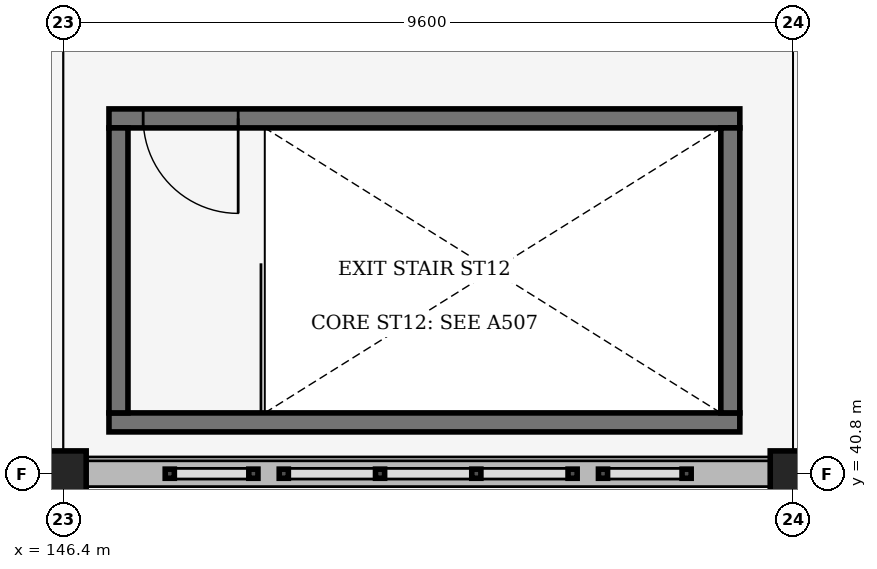
"""IFC4 building model, lengths in metres.
Left out: names, types, materials, properties, quantities, classifications, styles, units other than length and angle.
Written with IfcOpenShell. Run it as: python <this file> out.ifc"""

import sys

from ifc_helpers import new_model, si_unit, direction, frame, frame_2d, origin, origin_2d, place, context, subcontext, project, spatial, rectangle, extrude, element, fill, save


model = new_model("IFC4")
c1 = context("Model", 3, precision=1e-05, world=origin(), true_north=direction((0.0, 1.0)))
c2 = subcontext(c1, "Body", "Model", "MODEL_VIEW")
j1 = project(units=[si_unit("LENGTHUNIT", "METRE"), si_unit("PLANEANGLEUNIT", "RADIAN")], contexts=[c1])
p1 = place(None, origin())
s1 = spatial("IfcSite", under=j1, at=p1, CompositionType="ELEMENT")
p2 = place(p1, origin())
s2 = spatial("IfcBuilding", under=s1, at=p2, CompositionType="ELEMENT")
p3 = place(p2, frame((0.0, 0.0, 15.3)))
s3 = spatial("IfcBuildingStorey", under=s2, at=p3, CompositionType="ELEMENT", Elevation=15.3)
for number, where, z_axis, x_axis in (
    (1, (146.4, 40.8, 0.0), (0.0, 0.0, 1.0), (1.0, 0.0, 0.0)),
    (2, (156.0, 40.8, 0.0), (0.0, 0.0, 1.0), (1.0, 0.0, 0.0)),
):
    element("IfcColumn", number, at=place(p3, frame(where, z_axis=z_axis, x_axis=x_axis)), inside=s3, PredefinedType="COLUMN", context=c2, shape_type="SweptSolid", body=[
        extrude(rectangle(XDim=0.6, YDim=0.6, at=origin_2d()), origin(), (0.0, 0.0, 1.0), 4.5),
    ])
p4 = place(p3, frame((146.7, 40.8, 0.0), z_axis=(0.0, 0.0, 1.0), x_axis=(1.0, 0.0, 0.0)))
e3 = element("IfcWall", 3, at=p4, inside=s3, PredefinedType="SOLIDWALL", context=c2, shape_type="SweptSolid", body=[
    extrude(rectangle(XDim=9.0, YDim=0.34, at=frame_2d((4.5, 0.0))), origin(), (0.0, 0.0, 1.0), 1.12),
])
p5 = place(p3, frame((147.0, 41.475, 0.0), z_axis=(0.0, 0.0, 1.0), x_axis=(1.0, 0.0, 0.0)))
e4 = element("IfcWall", 4, at=p5, inside=s3, PredefinedType="SHEAR", context=c2, shape_type="SweptSolid", body=[
    extrude(rectangle(XDim=8.3, YDim=0.25, at=frame_2d((4.15, 0.0))), origin(), (0.0, 0.0, 1.0), 4.5),
])
p6 = place(p3, frame((155.3, 45.475, 0.0), z_axis=(0.0, 0.0, 1.0), x_axis=(-1.0, 0.0, 0.0)))
e5 = element("IfcWall", 5, at=p6, inside=s3, PredefinedType="SHEAR", context=c2, shape_type="SweptSolid", body=[
    extrude(rectangle(XDim=8.3, YDim=0.25, at=frame_2d((4.15, 0.0))), origin(), (0.0, 0.0, 1.0), 4.5),
])
p7 = place(p6, frame((7.85, 0.0, 0.0), z_axis=(0.0, 0.0, 1.0), x_axis=(-1.0, 0.0, 0.0)))
e6 = element("IfcOpeningElement", 6, at=p7, cuts=e5, PredefinedType="OPENING", context=c2, shape_type="SweptSolid", body=[
    extrude(rectangle(XDim=1.25, YDim=2.2, at=frame_2d((0.625, 1.1))), frame((0.0, 0.135, 0.0), z_axis=(0.0, -1.0, 0.0), x_axis=(1.0, 0.0, 0.0)), (0.0, 0.0, 1.0), 0.27),
])
for number, where, z_axis, x_axis in (
    (7, (147.125, 45.35, 0.0), (0.0, 0.0, 1.0), (0.0, -1.0, 0.0)),
    (8, (155.175, 41.6, 0.0), (0.0, 0.0, 1.0), (0.0, 1.0, 0.0)),
):
    element("IfcWall", number, at=place(p3, frame(where, z_axis=z_axis, x_axis=x_axis)), inside=s3, PredefinedType="SHEAR", context=c2, shape_type="SweptSolid", body=[
        extrude(rectangle(XDim=3.75, YDim=0.25, at=frame_2d((1.875, 0.0))), origin(), (0.0, 0.0, 1.0), 4.5),
    ])
p8 = place(p7, origin())
e9 = element("IfcDoor", 9, at=p8, inside=s3, OperationType="SINGLE_SWING_RIGHT", PredefinedType="DOOR", context=c2, shape_type="SweptSolid", body=[
    extrude(rectangle(XDim=1.25, YDim=2.2, at=frame_2d((0.625, 1.1))), frame((0.0, 0.025, 0.0), z_axis=(0.0, -1.0, 0.0), x_axis=(1.0, 0.0, 0.0)), (0.0, 0.0, 1.0), 0.05),
])
fill(e6, e9)
save(model, sys.argv[1])
